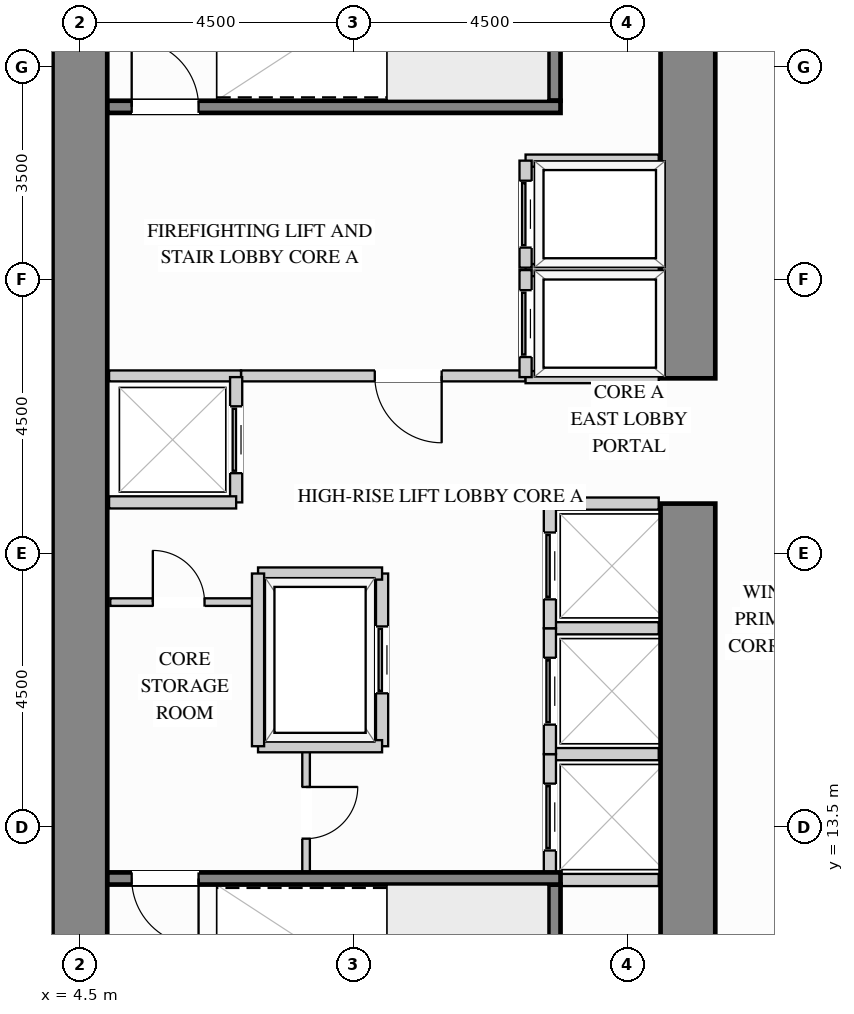
"""IFC4 building model, lengths in metres.
Left out: names, types, materials, properties, quantities, classifications, styles, units other than length and angle.
Written with IfcOpenShell. Run it as: python <this file> out.ifc"""

import sys

from ifc_helpers import new_model, si_unit, direction, frame, frame_2d, origin, place, context, subcontext, project, spatial, rectangle, extrude, source, transform, mapped, element, fill, save


model = new_model("IFC4")
c1 = context("Model", 3, precision=1e-05, world=origin(), true_north=direction((0.0, 1.0)))
c2 = subcontext(c1, "Body", "Model", "MODEL_VIEW")
j1 = project(units=[si_unit("LENGTHUNIT", "METRE"), si_unit("PLANEANGLEUNIT", "RADIAN")], contexts=[c1])
p1 = place(None, origin())
s1 = spatial("IfcSite", under=j1, at=p1, CompositionType="ELEMENT")
p2 = place(p1, origin())
s2 = spatial("IfcBuilding", under=s1, at=p2, CompositionType="ELEMENT")
p3 = place(p2, frame((0.0, 0.0, 62.1)))
s3 = spatial("IfcBuildingStorey", under=s2, at=p3, CompositionType="ELEMENT", Elevation=62.1)
m1 = source(origin(), c2, "Body", "SweptSolid", [
    extrude(rectangle(XDim=9.87, YDim=0.9, at=frame_2d((4.935, 0.0))), origin(), (0.0, 0.0, 1.0), 3.38),
])
p4 = place(p3, frame((14.5, 8.95, 0.0), z_axis=(0.0, 0.0, 1.0), x_axis=(0.0, 1.0, 0.0)))
e1 = element("IfcWall", 1, at=p4, inside=s3, PredefinedType="SHEAR", context=c2, shape_type="MappedRepresentation", body=[
    mapped(m1, transform((0.0, 0.0, 0.0), x_axis=(1.0, 0.0, 0.0), y_axis=(0.0, 1.0, 0.0), z_axis=(0.0, 0.0, 1.0))),
])
m2 = source(origin(), c2, "Body", "SweptSolid", [
    extrude(rectangle(XDim=8.17, YDim=0.9, at=frame_2d((4.085, 0.0))), origin(), (0.0, 0.0, 1.0), 3.38),
])
p5 = place(p3, frame((14.5, 20.88, 0.0), z_axis=(0.0, 0.0, 1.0), x_axis=(0.0, 1.0, 0.0)))
e2 = element("IfcWall", 2, at=p5, inside=s3, PredefinedType="SHEAR", context=c2, shape_type="MappedRepresentation", body=[
    mapped(m2, transform((0.0, 0.0, 0.0), x_axis=(1.0, 0.0, 0.0), y_axis=(0.0, 1.0, 0.0), z_axis=(0.0, 0.0, 1.0))),
])
m3 = source(origin(), c2, "Body", "SweptSolid", [
    extrude(rectangle(XDim=20.1, YDim=0.9, at=frame_2d((10.05, 0.0))), origin(), (0.0, 0.0, 1.0), 3.38),
])
p6 = place(p3, frame((4.5, 8.95, 0.0), z_axis=(0.0, 0.0, 1.0), x_axis=(0.0, 1.0, 0.0)))
e3 = element("IfcWall", 3, at=p6, inside=s3, PredefinedType="SHEAR", context=c2, shape_type="MappedRepresentation", body=[
    mapped(m3, transform((0.0, 0.0, 0.0), x_axis=(1.0, 0.0, 0.0), y_axis=(0.0, 1.0, 0.0), z_axis=(0.0, 0.0, 1.0))),
])
p7 = place(p3, frame((7.15, 20.92, 0.0), z_axis=(0.0, 0.0, 1.0), x_axis=(1.0, 0.0, 0.0)))
e4 = element("IfcWall", 4, at=p7, inside=s3, PredefinedType="PARTITIONING", context=c2, shape_type="SweptSolid", body=[
    extrude(rectangle(XDim=4.68, YDim=0.18, at=frame_2d((2.34, 0.0))), origin(), (0.0, 0.0, 1.0), 3.365),
])
p8 = place(p7, frame((2.2, 0.0, 0.0)))
e5 = element("IfcOpeningElement", 5, at=p8, cuts=e4, PredefinedType="OPENING", context=c2, shape_type="SweptSolid", body=[
    extrude(rectangle(XDim=1.1, YDim=2.15, at=frame_2d((0.55, 1.075))), frame((0.0, 0.1, 0.0), z_axis=(0.0, -1.0, 0.0), x_axis=(1.0, 0.0, 0.0)), (0.0, 0.0, 1.0), 0.2),
])
m4 = source(origin(), c2, "Body", "SweptSolid", [
    extrude(rectangle(XDim=2.17, YDim=0.18, at=frame_2d((1.085, 0.0))), origin(), (0.0, 0.0, 1.0), 3.365),
])
p9 = place(p3, frame((4.98, 20.92, 0.0), z_axis=(0.0, 0.0, 1.0), x_axis=(1.0, 0.0, 0.0)))
e6 = element("IfcWall", 6, at=p9, inside=s3, PredefinedType="PARTITIONING", context=c2, shape_type="MappedRepresentation", body=[
    mapped(m4, transform((0.0, 0.0, 0.0), x_axis=(1.0, 0.0, 0.0), y_axis=(0.0, 1.0, 0.0), z_axis=(0.0, 0.0, 1.0))),
])
p10 = place(p3, frame((8.22, 12.75, 0.0), z_axis=(0.0, 0.0, 1.0), x_axis=(0.0, 1.0, 0.0)))
e7 = element("IfcWall", 7, at=p10, inside=s3, PredefinedType="PARTITIONING", context=c2, shape_type="SweptSolid", body=[
    extrude(rectangle(XDim=2.07, YDim=0.125, at=frame_2d((1.035, 0.0))), origin(), (0.0, 0.0, 1.0), 3.365),
])
p11 = place(p10, frame((0.56, 0.0, 0.0)))
e8 = element("IfcOpeningElement", 8, at=p11, cuts=e7, PredefinedType="OPENING", context=c2, shape_type="SweptSolid", body=[
    extrude(rectangle(XDim=0.85, YDim=2.1, at=frame_2d((0.425, 1.05))), frame((0.0, 0.073, 0.0), z_axis=(0.0, -1.0, 0.0), x_axis=(1.0, 0.0, 0.0)), (0.0, 0.0, 1.0), 0.145),
])
p12 = place(p3, frame((5.0, 17.2, 0.0), z_axis=(0.0, 0.0, 1.0), x_axis=(1.0, 0.0, 0.0)))
e9 = element("IfcWall", 9, at=p12, inside=s3, PredefinedType="PARTITIONING", context=c2, shape_type="SweptSolid", body=[
    extrude(rectangle(XDim=2.4, YDim=0.125, at=frame_2d((1.2, 0.0))), origin(), (0.0, 0.0, 1.0), 3.365),
])
p13 = place(p12, frame((0.7, 0.0, 0.0)))
e10 = element("IfcOpeningElement", 10, at=p13, cuts=e9, PredefinedType="OPENING", context=c2, shape_type="SweptSolid", body=[
    extrude(rectangle(XDim=0.85, YDim=2.1, at=frame_2d((0.425, 1.05))), frame((0.0, 0.073, 0.0), z_axis=(0.0, -1.0, 0.0), x_axis=(1.0, 0.0, 0.0)), (0.0, 0.0, 1.0), 0.145),
])
m5 = source(origin(), c2, "Body", "SweptSolid", [
    extrude(rectangle(XDim=2.19, YDim=0.2, at=frame_2d((1.095, 0.0))), origin(), (0.0, 0.0, 1.0), 3.365),
])
for number, where, z_axis, x_axis in (
    (11, (11.83, 22.66, 0.0), (0.0, 0.0, 1.0), (1.0, 0.0, 0.0)),
    (12, (11.83, 20.9, 0.0), (0.0, 0.0, 1.0), (1.0, 0.0, 0.0)),
):
    element("IfcWall", number, at=place(p3, frame(where, z_axis=z_axis, x_axis=x_axis)), inside=s3, PredefinedType="PARTITIONING", context=c2, shape_type="MappedRepresentation", body=[
        mapped(m5, transform((0.0, 0.0, 0.0), x_axis=(1.0, 0.0, 0.0), y_axis=(0.0, 1.0, 0.0), z_axis=(0.0, 0.0, 1.0))),
    ])
p14 = place(p3, frame((11.83, 20.9, 0.0), z_axis=(0.0, 0.0, 1.0), x_axis=(0.0, 1.0, 0.0)))
e13 = element("IfcWall", 13, at=p14, inside=s3, PredefinedType="PARTITIONING", context=c2, shape_type="SweptSolid", body=[
    extrude(rectangle(XDim=1.76, YDim=0.2, at=frame_2d((0.88, 0.0))), origin(), (0.0, 0.0, 1.0), 3.365),
])
p15 = place(p14, frame((0.33, 0.0, 0.0)))
e14 = element("IfcOpeningElement", 14, at=p15, cuts=e13, PredefinedType="OPENING", context=c2, shape_type="SweptSolid", body=[
    extrude(rectangle(XDim=1.1, YDim=2.2, at=frame_2d((0.55, 1.1))), frame((0.0, 0.11, 0.0), z_axis=(0.0, -1.0, 0.0), x_axis=(1.0, 0.0, 0.0)), (0.0, 0.0, 1.0), 0.22),
])
p16 = place(p3, frame((11.83, 24.46, 0.0), z_axis=(0.0, 0.0, 1.0), x_axis=(1.0, 0.0, 0.0)))
e15 = element("IfcWall", 15, at=p16, inside=s3, PredefinedType="PARTITIONING", context=c2, shape_type="MappedRepresentation", body=[
    mapped(m5, transform((0.0, 0.0, 0.0), x_axis=(1.0, 0.0, 0.0), y_axis=(0.0, 1.0, 0.0), z_axis=(0.0, 0.0, 1.0))),
])
p17 = place(p3, frame((11.83, 22.7, 0.0), z_axis=(0.0, 0.0, 1.0), x_axis=(0.0, 1.0, 0.0)))
e16 = element("IfcWall", 16, at=p17, inside=s3, PredefinedType="PARTITIONING", context=c2, shape_type="SweptSolid", body=[
    extrude(rectangle(XDim=1.76, YDim=0.2, at=frame_2d((0.88, 0.0))), origin(), (0.0, 0.0, 1.0), 3.365),
])
p18 = place(p17, frame((0.33, 0.0, 0.0)))
e17 = element("IfcOpeningElement", 17, at=p18, cuts=e16, PredefinedType="OPENING", context=c2, shape_type="SweptSolid", body=[
    extrude(rectangle(XDim=1.1, YDim=2.2, at=frame_2d((0.55, 1.1))), frame((0.0, 0.11, 0.0), z_axis=(0.0, -1.0, 0.0), x_axis=(1.0, 0.0, 0.0)), (0.0, 0.0, 1.0), 0.22),
])
m6 = source(origin(), c2, "Body", "SweptSolid", [
    extrude(rectangle(XDim=1.79, YDim=0.2, at=frame_2d((0.895, 0.0))), origin(), (0.0, 0.0, 1.0), 3.365),
])
for number, where, z_axis, x_axis in (
    (18, (12.23, 14.7, 0.0), (0.0, 0.0, 1.0), (1.0, 0.0, 0.0)),
    (19, (12.23, 12.63, 0.0), (0.0, 0.0, 1.0), (1.0, 0.0, 0.0)),
):
    element("IfcWall", number, at=place(p3, frame(where, z_axis=z_axis, x_axis=x_axis)), inside=s3, PredefinedType="PARTITIONING", context=c2, shape_type="MappedRepresentation", body=[
        mapped(m6, transform((0.0, 0.0, 0.0), x_axis=(1.0, 0.0, 0.0), y_axis=(0.0, 1.0, 0.0), z_axis=(0.0, 0.0, 1.0))),
    ])
p19 = place(p3, frame((12.23, 12.63, 0.0), z_axis=(0.0, 0.0, 1.0), x_axis=(0.0, 1.0, 0.0)))
e20 = element("IfcWall", 20, at=p19, inside=s3, PredefinedType="PARTITIONING", context=c2, shape_type="SweptSolid", body=[
    extrude(rectangle(XDim=2.07, YDim=0.2, at=frame_2d((1.035, 0.0))), origin(), (0.0, 0.0, 1.0), 3.365),
])
p20 = place(p19, frame((0.485, 0.0, 0.0)))
e21 = element("IfcOpeningElement", 21, at=p20, cuts=e20, PredefinedType="OPENING", context=c2, shape_type="SweptSolid", body=[
    extrude(rectangle(XDim=1.1, YDim=2.2, at=frame_2d((0.55, 1.1))), frame((0.0, 0.11, 0.0), z_axis=(0.0, -1.0, 0.0), x_axis=(1.0, 0.0, 0.0)), (0.0, 0.0, 1.0), 0.22),
])
p21 = place(p3, frame((12.23, 16.77, 0.0), z_axis=(0.0, 0.0, 1.0), x_axis=(1.0, 0.0, 0.0)))
e22 = element("IfcWall", 22, at=p21, inside=s3, PredefinedType="PARTITIONING", context=c2, shape_type="MappedRepresentation", body=[
    mapped(m6, transform((0.0, 0.0, 0.0), x_axis=(1.0, 0.0, 0.0), y_axis=(0.0, 1.0, 0.0), z_axis=(0.0, 0.0, 1.0))),
])
p22 = place(p3, frame((12.23, 14.7, 0.0), z_axis=(0.0, 0.0, 1.0), x_axis=(0.0, 1.0, 0.0)))
e23 = element("IfcWall", 23, at=p22, inside=s3, PredefinedType="PARTITIONING", context=c2, shape_type="SweptSolid", body=[
    extrude(rectangle(XDim=2.07, YDim=0.2, at=frame_2d((1.035, 0.0))), origin(), (0.0, 0.0, 1.0), 3.365),
])
p23 = place(p22, frame((0.485, 0.0, 0.0)))
e24 = element("IfcOpeningElement", 24, at=p23, cuts=e23, PredefinedType="OPENING", context=c2, shape_type="SweptSolid", body=[
    extrude(rectangle(XDim=1.1, YDim=2.2, at=frame_2d((0.55, 1.1))), frame((0.0, 0.11, 0.0), z_axis=(0.0, -1.0, 0.0), x_axis=(1.0, 0.0, 0.0)), (0.0, 0.0, 1.0), 0.22),
])
p24 = place(p3, frame((12.23, 18.82, 0.0), z_axis=(0.0, 0.0, 1.0), x_axis=(1.0, 0.0, 0.0)))
e25 = element("IfcWall", 25, at=p24, inside=s3, PredefinedType="PARTITIONING", context=c2, shape_type="MappedRepresentation", body=[
    mapped(m6, transform((0.0, 0.0, 0.0), x_axis=(1.0, 0.0, 0.0), y_axis=(0.0, 1.0, 0.0), z_axis=(0.0, 0.0, 1.0))),
])
p25 = place(p3, frame((12.23, 16.77, 0.0), z_axis=(0.0, 0.0, 1.0), x_axis=(0.0, 1.0, 0.0)))
e26 = element("IfcWall", 26, at=p25, inside=s3, PredefinedType="PARTITIONING", context=c2, shape_type="SweptSolid", body=[
    extrude(rectangle(XDim=2.05, YDim=0.2, at=frame_2d((1.025, 0.0))), origin(), (0.0, 0.0, 1.0), 3.365),
])
p26 = place(p25, frame((0.475, 0.0, 0.0)))
e27 = element("IfcOpeningElement", 27, at=p26, cuts=e26, PredefinedType="OPENING", context=c2, shape_type="SweptSolid", body=[
    extrude(rectangle(XDim=1.1, YDim=2.2, at=frame_2d((0.55, 1.1))), frame((0.0, 0.11, 0.0), z_axis=(0.0, -1.0, 0.0), x_axis=(1.0, 0.0, 0.0)), (0.0, 0.0, 1.0), 0.22),
])
p27 = place(p3, frame((7.07, 18.84, 0.0), z_axis=(0.0, 0.0, 1.0), x_axis=(0.0, 1.0, 0.0)))
e28 = element("IfcWall", 28, at=p27, inside=s3, PredefinedType="PARTITIONING", context=c2, shape_type="SweptSolid", body=[
    extrude(rectangle(XDim=2.06, YDim=0.2, at=frame_2d((1.03, 0.0))), origin(), (0.0, 0.0, 1.0), 3.365),
])
p28 = place(p27, frame((0.48, 0.0, 0.0)))
e29 = element("IfcOpeningElement", 29, at=p28, cuts=e28, PredefinedType="OPENING", context=c2, shape_type="SweptSolid", body=[
    extrude(rectangle(XDim=1.1, YDim=2.2, at=frame_2d((0.55, 1.1))), frame((0.0, 0.11, 0.0), z_axis=(0.0, -1.0, 0.0), x_axis=(1.0, 0.0, 0.0)), (0.0, 0.0, 1.0), 0.22),
])
m7 = source(origin(), c2, "Body", "SweptSolid", [
    extrude(rectangle(XDim=2.09, YDim=0.2, at=frame_2d((1.045, 0.0))), origin(), (0.0, 0.0, 1.0), 3.365),
])
p29 = place(p3, frame((4.98, 18.84, 0.0), z_axis=(0.0, 0.0, 1.0), x_axis=(1.0, 0.0, 0.0)))
e30 = element("IfcWall", 30, at=p29, inside=s3, PredefinedType="PARTITIONING", context=c2, shape_type="MappedRepresentation", body=[
    mapped(m7, transform((0.0, 0.0, 0.0), x_axis=(1.0, 0.0, 0.0), y_axis=(0.0, 1.0, 0.0), z_axis=(0.0, 0.0, 1.0))),
])
p30 = place(p3, frame((9.47, 14.83, 0.0), z_axis=(0.0, 0.0, 1.0), x_axis=(0.0, 1.0, 0.0)))
e31 = element("IfcWall", 31, at=p30, inside=s3, PredefinedType="PARTITIONING", context=c2, shape_type="SweptSolid", body=[
    extrude(rectangle(XDim=2.84, YDim=0.2, at=frame_2d((1.42, 0.0))), origin(), (0.0, 0.0, 1.0), 3.365),
])
p31 = place(p30, frame((0.87, 0.0, 0.0)))
e32 = element("IfcOpeningElement", 32, at=p31, cuts=e31, PredefinedType="OPENING", context=c2, shape_type="SweptSolid", body=[
    extrude(rectangle(XDim=1.1, YDim=2.2, at=frame_2d((0.55, 1.1))), frame((0.0, 0.11, 0.0), z_axis=(0.0, -1.0, 0.0), x_axis=(1.0, 0.0, 0.0)), (0.0, 0.0, 1.0), 0.22),
])
m8 = source(origin(), c2, "Body", "SweptSolid", [
    extrude(rectangle(XDim=2.04, YDim=0.2, at=frame_2d((1.02, 0.0))), origin(), (0.0, 0.0, 1.0), 3.365),
])
for number, where, z_axis, x_axis in (
    (33, (7.43, 17.67, 0.0), (0.0, 0.0, 1.0), (1.0, 0.0, 0.0)),
    (34, (7.43, 14.83, 0.0), (0.0, 0.0, 1.0), (1.0, 0.0, 0.0)),
):
    element("IfcWall", number, at=place(p3, frame(where, z_axis=z_axis, x_axis=x_axis)), inside=s3, PredefinedType="PARTITIONING", context=c2, shape_type="MappedRepresentation", body=[
        mapped(m8, transform((0.0, 0.0, 0.0), x_axis=(1.0, 0.0, 0.0), y_axis=(0.0, 1.0, 0.0), z_axis=(0.0, 0.0, 1.0))),
    ])
m9 = source(origin(), c2, "Body", "SweptSolid", [
    extrude(rectangle(XDim=2.84, YDim=0.2, at=frame_2d((1.42, 0.0))), origin(), (0.0, 0.0, 1.0), 3.365),
])
p32 = place(p3, frame((7.43, 14.83, 0.0), z_axis=(0.0, 0.0, 1.0), x_axis=(0.0, 1.0, 0.0)))
e35 = element("IfcWall", 35, at=p32, inside=s3, PredefinedType="PARTITIONING", context=c2, shape_type="MappedRepresentation", body=[
    mapped(m9, transform((0.0, 0.0, 0.0), x_axis=(1.0, 0.0, 0.0), y_axis=(0.0, 1.0, 0.0), z_axis=(0.0, 0.0, 1.0))),
])
m10 = source(origin(), c2, "Body", "SweptSolid", [
    extrude(rectangle(XDim=3.603, YDim=0.2, at=frame_2d((1.802, 0.0))), origin(), (0.0, 0.0, 1.0), 3.38),
])
p33 = place(p3, frame((12.305, 8.952, 0.0), z_axis=(0.0, 0.0, 1.0), x_axis=(0.0, 1.0, 0.0)))
e36 = element("IfcWall", 36, at=p33, inside=s3, PredefinedType="SHEAR", context=c2, shape_type="MappedRepresentation", body=[
    mapped(m10, transform((0.0, 0.0, 0.0), x_axis=(1.0, 0.0, 0.0), y_axis=(0.0, 1.0, 0.0), z_axis=(0.0, 0.0, 1.0))),
])
p34 = place(p3, frame((4.952, 12.655, 0.0), z_axis=(0.0, 0.0, 1.0), x_axis=(1.0, 0.0, 0.0)))
e37 = element("IfcWall", 37, at=p34, inside=s3, PredefinedType="SHEAR", context=c2, shape_type="SweptSolid", body=[
    extrude(rectangle(XDim=7.453, YDim=0.2, at=frame_2d((3.727, 0.0))), origin(), (0.0, 0.0, 1.0), 3.38),
])
p35 = place(p34, frame((0.4, 0.0, 0.0)))
e38 = element("IfcOpeningElement", 38, at=p35, cuts=e37, PredefinedType="OPENING", context=c2, shape_type="SweptSolid", body=[
    extrude(rectangle(XDim=1.1, YDim=2.15, at=frame_2d((0.55, 1.075))), frame((0.0, 0.11, 0.0), z_axis=(0.0, -1.0, 0.0), x_axis=(1.0, 0.0, 0.0)), (0.0, 0.0, 1.0), 0.22),
])
p36 = place(p3, frame((12.305, 25.445, 0.0), z_axis=(0.0, 0.0, 1.0), x_axis=(0.0, 1.0, 0.0)))
e39 = element("IfcWall", 39, at=p36, inside=s3, PredefinedType="SHEAR", context=c2, shape_type="MappedRepresentation", body=[
    mapped(m10, transform((0.0, 0.0, 0.0), x_axis=(1.0, 0.0, 0.0), y_axis=(0.0, 1.0, 0.0), z_axis=(0.0, 0.0, 1.0))),
])
p37 = place(p3, frame((4.952, 25.345, 0.0), z_axis=(0.0, 0.0, 1.0), x_axis=(1.0, 0.0, 0.0)))
e40 = element("IfcWall", 40, at=p37, inside=s3, PredefinedType="SHEAR", context=c2, shape_type="SweptSolid", body=[
    extrude(rectangle(XDim=7.453, YDim=0.2, at=frame_2d((3.727, 0.0))), origin(), (0.0, 0.0, 1.0), 3.38),
])
p38 = place(p37, frame((0.4, 0.0, 0.0)))
e41 = element("IfcOpeningElement", 41, at=p38, cuts=e40, PredefinedType="OPENING", context=c2, shape_type="SweptSolid", body=[
    extrude(rectangle(XDim=1.1, YDim=2.15, at=frame_2d((0.55, 1.075))), frame((0.0, 0.11, 0.0), z_axis=(0.0, -1.0, 0.0), x_axis=(1.0, 0.0, 0.0)), (0.0, 0.0, 1.0), 0.22),
])
m11 = source(origin(), c2, "Body", "SweptSolid", [
    extrude(rectangle(XDim=1.1, YDim=2.15, at=frame_2d((0.55, 1.075))), frame((0.0, 0.025, 0.0), z_axis=(0.0, -1.0, 0.0), x_axis=(1.0, 0.0, 0.0)), (0.0, 0.0, 1.0), 0.05),
])
p39 = place(p8, origin())
e42 = element("IfcDoor", 42, at=p39, inside=s3, OperationType="SINGLE_SWING_RIGHT", PredefinedType="DOOR", context=c2, shape_type="MappedRepresentation", body=[
    mapped(m11, transform((0.0, 0.0, 0.0), x_axis=(1.0, 0.0, 0.0), y_axis=(0.0, 1.0, 0.0), z_axis=(0.0, 0.0, 1.0))),
])
fill(e5, e42)
m12 = source(origin(), c2, "Body", "SweptSolid", [
    extrude(rectangle(XDim=1.1, YDim=2.2, at=frame_2d((0.55, 1.1))), frame((0.0, 0.025, 0.0), z_axis=(0.0, -1.0, 0.0), x_axis=(1.0, 0.0, 0.0)), (0.0, 0.0, 1.0), 0.05),
])
p40 = place(p15, origin())
e43 = element("IfcDoor", 43, at=p40, inside=s3, OperationType="SLIDING_TO_LEFT", PredefinedType="DOOR", context=c2, shape_type="MappedRepresentation", body=[
    mapped(m12, transform((0.0, 0.0, 0.0), x_axis=(1.0, 0.0, 0.0), y_axis=(0.0, 1.0, 0.0), z_axis=(0.0, 0.0, 1.0))),
])
fill(e14, e43)
p41 = place(p18, origin())
e44 = element("IfcDoor", 44, at=p41, inside=s3, OperationType="SLIDING_TO_LEFT", PredefinedType="DOOR", context=c2, shape_type="MappedRepresentation", body=[
    mapped(m12, transform((0.0, 0.0, 0.0), x_axis=(1.0, 0.0, 0.0), y_axis=(0.0, 1.0, 0.0), z_axis=(0.0, 0.0, 1.0))),
])
fill(e17, e44)
p42 = place(p20, origin())
e45 = element("IfcDoor", 45, at=p42, inside=s3, OperationType="SLIDING_TO_LEFT", PredefinedType="DOOR", context=c2, shape_type="MappedRepresentation", body=[
    mapped(m12, transform((0.0, 0.0, 0.0), x_axis=(1.0, 0.0, 0.0), y_axis=(0.0, 1.0, 0.0), z_axis=(0.0, 0.0, 1.0))),
])
fill(e21, e45)
p43 = place(p23, origin())
e46 = element("IfcDoor", 46, at=p43, inside=s3, OperationType="SLIDING_TO_LEFT", PredefinedType="DOOR", context=c2, shape_type="MappedRepresentation", body=[
    mapped(m12, transform((0.0, 0.0, 0.0), x_axis=(1.0, 0.0, 0.0), y_axis=(0.0, 1.0, 0.0), z_axis=(0.0, 0.0, 1.0))),
])
fill(e24, e46)
p44 = place(p26, origin())
e47 = element("IfcDoor", 47, at=p44, inside=s3, OperationType="SLIDING_TO_LEFT", PredefinedType="DOOR", context=c2, shape_type="MappedRepresentation", body=[
    mapped(m12, transform((0.0, 0.0, 0.0), x_axis=(1.0, 0.0, 0.0), y_axis=(0.0, 1.0, 0.0), z_axis=(0.0, 0.0, 1.0))),
])
fill(e27, e47)
p45 = place(p28, origin())
e48 = element("IfcDoor", 48, at=p45, inside=s3, OperationType="SLIDING_TO_LEFT", PredefinedType="DOOR", context=c2, shape_type="MappedRepresentation", body=[
    mapped(m12, transform((0.0, 0.0, 0.0), x_axis=(1.0, 0.0, 0.0), y_axis=(0.0, 1.0, 0.0), z_axis=(0.0, 0.0, 1.0))),
])
fill(e29, e48)
p46 = place(p31, origin())
e49 = element("IfcDoor", 49, at=p46, inside=s3, OperationType="SLIDING_TO_LEFT", PredefinedType="DOOR", context=c2, shape_type="MappedRepresentation", body=[
    mapped(m12, transform((0.0, 0.0, 0.0), x_axis=(1.0, 0.0, 0.0), y_axis=(0.0, 1.0, 0.0), z_axis=(0.0, 0.0, 1.0))),
])
fill(e32, e49)
m13 = source(origin(), c2, "Body", "SweptSolid", [
    extrude(rectangle(XDim=0.85, YDim=2.1, at=frame_2d((0.425, 1.05))), frame((0.0, 0.025, 0.0), z_axis=(0.0, -1.0, 0.0), x_axis=(1.0, 0.0, 0.0)), (0.0, 0.0, 1.0), 0.05),
])
p47 = place(p13, origin())
e50 = element("IfcDoor", 50, at=p47, inside=s3, OperationType="SINGLE_SWING_LEFT", PredefinedType="DOOR", context=c2, shape_type="MappedRepresentation", body=[
    mapped(m13, transform((0.0, 0.0, 0.0), x_axis=(1.0, 0.0, 0.0), y_axis=(0.0, 1.0, 0.0), z_axis=(0.0, 0.0, 1.0))),
])
fill(e10, e50)
p48 = place(p11, origin())
e51 = element("IfcDoor", 51, at=p48, inside=s3, OperationType="SINGLE_SWING_RIGHT", PredefinedType="DOOR", context=c2, shape_type="MappedRepresentation", body=[
    mapped(m13, transform((0.0, 0.0, 0.0), x_axis=(1.0, 0.0, 0.0), y_axis=(0.0, 1.0, 0.0), z_axis=(0.0, 0.0, 1.0))),
])
fill(e8, e51)
m14 = source(origin(), c2, "Body", "SweptSolid", [
    extrude(rectangle(XDim=1.1, YDim=2.15, at=frame_2d((0.55, 1.075))), frame((0.0, 0.025, 0.0), z_axis=(0.0, -1.0, 0.0), x_axis=(1.0, 0.0, 0.0)), (0.0, 0.0, 1.0), 0.05),
])
p49 = place(p35, origin())
e52 = element("IfcDoor", 52, at=p49, inside=s3, OperationType="SINGLE_SWING_RIGHT", PredefinedType="DOOR", context=c2, shape_type="MappedRepresentation", body=[
    mapped(m14, transform((0.0, 0.0, 0.0), x_axis=(1.0, 0.0, 0.0), y_axis=(0.0, 1.0, 0.0), z_axis=(0.0, 0.0, 1.0))),
])
fill(e38, e52)
p50 = place(p38, origin())
e53 = element("IfcDoor", 53, at=p50, inside=s3, OperationType="SINGLE_SWING_LEFT", PredefinedType="DOOR", context=c2, shape_type="MappedRepresentation", body=[
    mapped(m14, transform((0.0, 0.0, 0.0), x_axis=(1.0, 0.0, 0.0), y_axis=(0.0, 1.0, 0.0), z_axis=(0.0, 0.0, 1.0))),
])
fill(e41, e53)
save(model, sys.argv[1])
